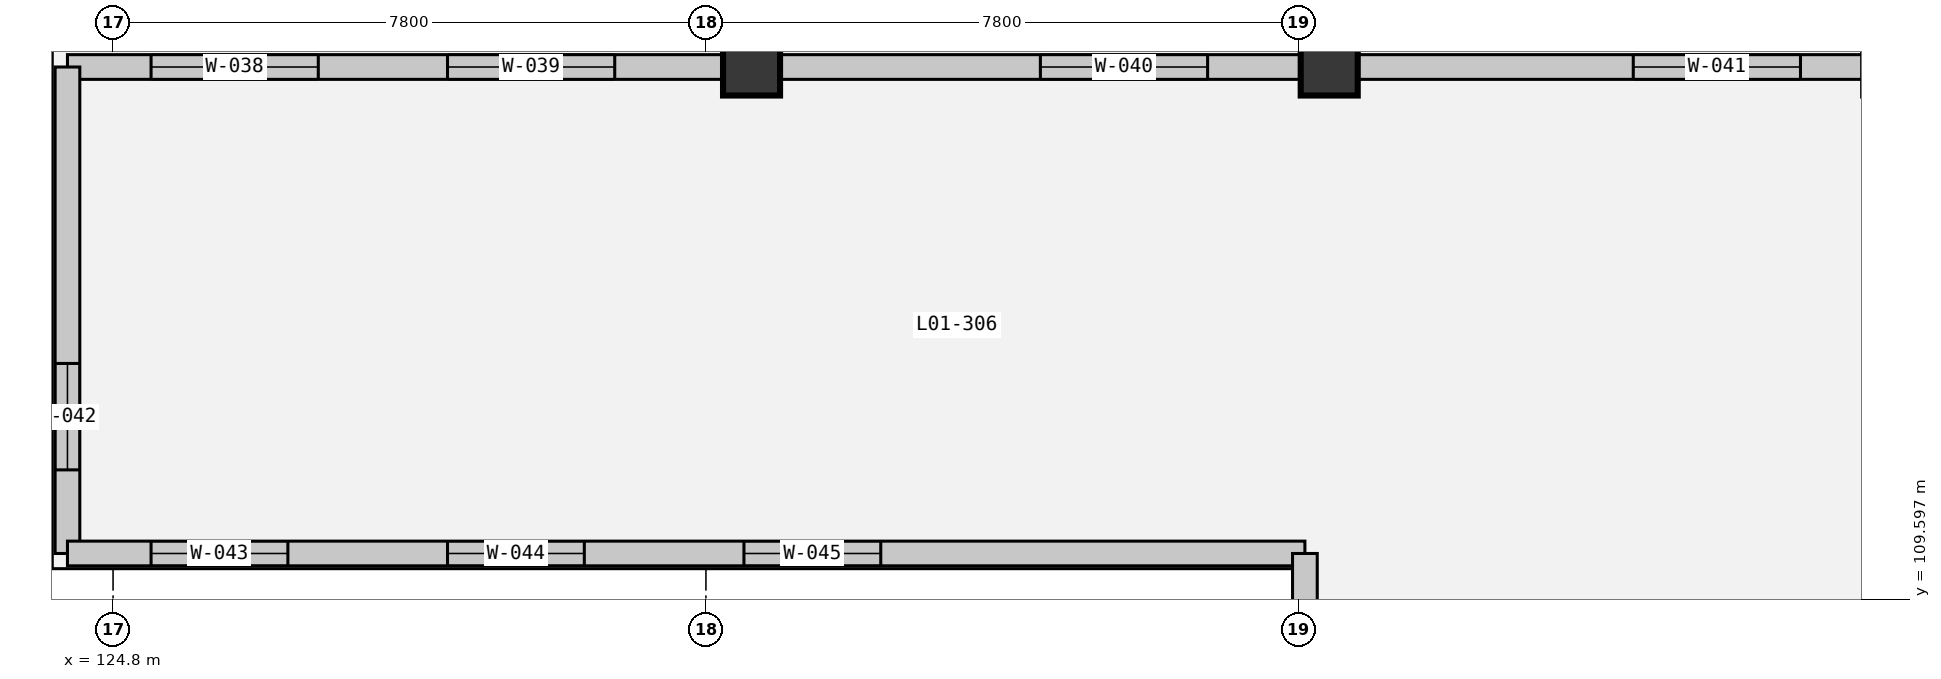
"""IFC4 building model, lengths in metres.
Left out: names, types, materials, properties, quantities, classifications, styles, units other than length and angle.
Written with IfcOpenShell. Run it as: python <this file> out.ifc"""

import sys

from ifc_helpers import new_model, si_unit, direction, frame, frame_2d, origin, origin_2d, place, context, subcontext, project, spatial, rectangle, extrude, element, fill, save


model = new_model("IFC4")
c1 = context("Model", 3, precision=1e-05, world=origin(), true_north=direction((0.0, 1.0)))
c2 = subcontext(c1, "Body", "Model", "MODEL_VIEW")
j1 = project(units=[si_unit("LENGTHUNIT", "METRE"), si_unit("PLANEANGLEUNIT", "RADIAN")], contexts=[c1])
p1 = place(None, origin())
s1 = spatial("IfcSite", under=j1, at=p1, CompositionType="ELEMENT")
p2 = place(p1, origin())
s2 = spatial("IfcBuilding", under=s1, at=p2, CompositionType="ELEMENT")
p3 = place(p2, frame((0.0, 0.0, 5.4)))
s3 = spatial("IfcBuildingStorey", under=s2, at=p3, CompositionType="ELEMENT", Elevation=5.4)
for number, where, z_axis, x_axis in (
    (1, (133.2, 116.6, 0.0), (0.0, 0.0, 1.0), (1.0, 0.0, 0.0)),
    (2, (140.8, 116.6, 0.0), (0.0, 0.0, 1.0), (1.0, 0.0, 0.0)),
):
    element("IfcColumn", number, at=place(p3, frame(where, z_axis=z_axis, x_axis=x_axis)), inside=s3, PredefinedType="COLUMN", context=c2, shape_type="SweptSolid", body=[
        extrude(rectangle(XDim=0.75, YDim=0.75, at=origin_2d()), origin(), (0.0, 0.0, 1.0), 4.8),
    ])
p4 = place(p3, frame((124.2, 116.6, 0.0), z_axis=(0.0, 0.0, 1.0), x_axis=(1.0, 0.0, 0.0)))
e3 = element("IfcWall", 3, at=p4, inside=s3, PredefinedType="SOLIDWALL", context=c2, shape_type="SweptSolid", body=[
    extrude(rectangle(XDim=32.7, YDim=0.325, at=frame_2d((16.35, 0.0))), origin(), (0.0, 0.0, 1.0), 3.86),
])
p5 = place(p4, frame((1.1, 0.0, 0.78)))
e4 = element("IfcOpeningElement", 4, at=p5, cuts=e3, PredefinedType="OPENING", context=c2, shape_type="SweptSolid", body=[
    extrude(rectangle(XDim=2.2, YDim=2.75, at=frame_2d((1.1, 1.375))), frame((0.0, 0.172, 0.0), z_axis=(0.0, -1.0, 0.0), x_axis=(1.0, 0.0, 0.0)), (0.0, 0.0, 1.0), 0.345),
])
p6 = place(p4, frame((5.0, 0.0, 0.78)))
e5 = element("IfcOpeningElement", 5, at=p6, cuts=e3, PredefinedType="OPENING", context=c2, shape_type="SweptSolid", body=[
    extrude(rectangle(XDim=2.2, YDim=2.75, at=frame_2d((1.1, 1.375))), frame((0.0, 0.172, 0.0), z_axis=(0.0, -1.0, 0.0), x_axis=(1.0, 0.0, 0.0)), (0.0, 0.0, 1.0), 0.345),
])
p7 = place(p4, frame((12.8, 0.0, 0.78)))
e6 = element("IfcOpeningElement", 6, at=p7, cuts=e3, PredefinedType="OPENING", context=c2, shape_type="SweptSolid", body=[
    extrude(rectangle(XDim=2.2, YDim=2.75, at=frame_2d((1.1, 1.375))), frame((0.0, 0.172, 0.0), z_axis=(0.0, -1.0, 0.0), x_axis=(1.0, 0.0, 0.0)), (0.0, 0.0, 1.0), 0.345),
])
p8 = place(p4, frame((20.6, 0.0, 0.78)))
e7 = element("IfcOpeningElement", 7, at=p8, cuts=e3, PredefinedType="OPENING", context=c2, shape_type="SweptSolid", body=[
    extrude(rectangle(XDim=2.2, YDim=2.75, at=frame_2d((1.1, 1.375))), frame((0.0, 0.172, 0.0), z_axis=(0.0, -1.0, 0.0), x_axis=(1.0, 0.0, 0.0)), (0.0, 0.0, 1.0), 0.345),
])
p9 = place(p3, frame((124.2, 110.2, 0.0), z_axis=(0.0, 0.0, 1.0), x_axis=(0.0, 1.0, 0.0)))
e8 = element("IfcWall", 8, at=p9, inside=s3, PredefinedType="SOLIDWALL", context=c2, shape_type="SweptSolid", body=[
    extrude(rectangle(XDim=6.4, YDim=0.325, at=frame_2d((3.2, 0.0))), origin(), (0.0, 0.0, 1.0), 3.86),
])
p10 = place(p9, frame((1.1, 0.0, 0.78)))
e9 = element("IfcOpeningElement", 9, at=p10, cuts=e8, PredefinedType="OPENING", context=c2, shape_type="SweptSolid", body=[
    extrude(rectangle(XDim=1.4, YDim=1.4, at=frame_2d((0.7, 0.7))), frame((0.0, 0.172, 0.0), z_axis=(0.0, -1.0, 0.0), x_axis=(1.0, 0.0, 0.0)), (0.0, 0.0, 1.0), 0.345),
])
p11 = place(p3, frame((124.2, 110.2, 0.0), z_axis=(0.0, 0.0, 1.0), x_axis=(1.0, 0.0, 0.0)))
e10 = element("IfcWall", 10, at=p11, inside=s3, PredefinedType="SOLIDWALL", context=c2, shape_type="SweptSolid", body=[
    extrude(rectangle(XDim=16.28, YDim=0.325, at=frame_2d((8.14, 0.0))), origin(), (0.0, 0.0, 1.0), 3.86),
])
p12 = place(p11, frame((1.1, 0.0, 0.78)))
e11 = element("IfcOpeningElement", 11, at=p12, cuts=e10, PredefinedType="OPENING", context=c2, shape_type="SweptSolid", body=[
    extrude(rectangle(XDim=1.8, YDim=2.1, at=frame_2d((0.9, 1.05))), frame((0.0, 0.172, 0.0), z_axis=(0.0, -1.0, 0.0), x_axis=(1.0, 0.0, 0.0)), (0.0, 0.0, 1.0), 0.345),
])
p13 = place(p11, frame((5.0, 0.0, 0.78)))
e12 = element("IfcOpeningElement", 12, at=p13, cuts=e10, PredefinedType="OPENING", context=c2, shape_type="SweptSolid", body=[
    extrude(rectangle(XDim=1.8, YDim=2.1, at=frame_2d((0.9, 1.05))), frame((0.0, 0.172, 0.0), z_axis=(0.0, -1.0, 0.0), x_axis=(1.0, 0.0, 0.0)), (0.0, 0.0, 1.0), 0.345),
])
p14 = place(p11, frame((8.9, 0.0, 0.78)))
e13 = element("IfcOpeningElement", 13, at=p14, cuts=e10, PredefinedType="OPENING", context=c2, shape_type="SweptSolid", body=[
    extrude(rectangle(XDim=1.8, YDim=2.1, at=frame_2d((0.9, 1.05))), frame((0.0, 0.172, 0.0), z_axis=(0.0, -1.0, 0.0), x_axis=(1.0, 0.0, 0.0)), (0.0, 0.0, 1.0), 0.345),
])
p15 = place(p3, frame((140.48, 32.0, 0.0), z_axis=(0.0, 0.0, 1.0), x_axis=(0.0, 1.0, 0.0)))
e14 = element("IfcWall", 14, at=p15, inside=s3, PredefinedType="SOLIDWALL", context=c2, shape_type="SweptSolid", body=[
    extrude(rectangle(XDim=78.2, YDim=0.325, at=frame_2d((39.1, 0.0))), origin(), (0.0, 0.0, 1.0), 3.86),
])
p16 = place(p15, frame((5.0, 0.0, 0.78)))
e15 = element("IfcOpeningElement", 15, at=p16, cuts=e14, PredefinedType="OPENING", context=c2, shape_type="SweptSolid", body=[
    extrude(rectangle(XDim=2.1, YDim=2.6, at=frame_2d((1.05, 1.3))), frame((0.0, 0.172, 0.0), z_axis=(0.0, -1.0, 0.0), x_axis=(1.0, 0.0, 0.0)), (0.0, 0.0, 1.0), 0.345),
])
p17 = place(p15, frame((16.7, 0.0, 0.78)))
e16 = element("IfcOpeningElement", 16, at=p17, cuts=e14, PredefinedType="OPENING", context=c2, shape_type="SweptSolid", body=[
    extrude(rectangle(XDim=2.1, YDim=2.6, at=frame_2d((1.05, 1.3))), frame((0.0, 0.172, 0.0), z_axis=(0.0, -1.0, 0.0), x_axis=(1.0, 0.0, 0.0)), (0.0, 0.0, 1.0), 0.345),
])
p18 = place(p15, frame((24.5, 0.0, 0.78)))
e17 = element("IfcOpeningElement", 17, at=p18, cuts=e14, PredefinedType="OPENING", context=c2, shape_type="SweptSolid", body=[
    extrude(rectangle(XDim=2.1, YDim=2.6, at=frame_2d((1.05, 1.3))), frame((0.0, 0.172, 0.0), z_axis=(0.0, -1.0, 0.0), x_axis=(1.0, 0.0, 0.0)), (0.0, 0.0, 1.0), 0.345),
])
p19 = place(p15, frame((32.3, 0.0, 0.78)))
e18 = element("IfcOpeningElement", 18, at=p19, cuts=e14, PredefinedType="OPENING", context=c2, shape_type="SweptSolid", body=[
    extrude(rectangle(XDim=2.1, YDim=2.6, at=frame_2d((1.05, 1.3))), frame((0.0, 0.172, 0.0), z_axis=(0.0, -1.0, 0.0), x_axis=(1.0, 0.0, 0.0)), (0.0, 0.0, 1.0), 0.345),
])
p20 = place(p15, frame((40.1, 0.0, 0.78)))
e19 = element("IfcOpeningElement", 19, at=p20, cuts=e14, PredefinedType="OPENING", context=c2, shape_type="SweptSolid", body=[
    extrude(rectangle(XDim=2.1, YDim=2.6, at=frame_2d((1.05, 1.3))), frame((0.0, 0.172, 0.0), z_axis=(0.0, -1.0, 0.0), x_axis=(1.0, 0.0, 0.0)), (0.0, 0.0, 1.0), 0.345),
])
p21 = place(p15, frame((55.7, 0.0, 0.78)))
e20 = element("IfcOpeningElement", 20, at=p21, cuts=e14, PredefinedType="OPENING", context=c2, shape_type="SweptSolid", body=[
    extrude(rectangle(XDim=2.1, YDim=2.6, at=frame_2d((1.05, 1.3))), frame((0.0, 0.172, 0.0), z_axis=(0.0, -1.0, 0.0), x_axis=(1.0, 0.0, 0.0)), (0.0, 0.0, 1.0), 0.345),
])
p22 = place(p15, frame((59.6, 0.0, 0.78)))
e21 = element("IfcOpeningElement", 21, at=p22, cuts=e14, PredefinedType="OPENING", context=c2, shape_type="SweptSolid", body=[
    extrude(rectangle(XDim=2.1, YDim=2.6, at=frame_2d((1.05, 1.3))), frame((0.0, 0.172, 0.0), z_axis=(0.0, -1.0, 0.0), x_axis=(1.0, 0.0, 0.0)), (0.0, 0.0, 1.0), 0.345),
])
p23 = place(p15, frame((63.5, 0.0, 0.78)))
e22 = element("IfcOpeningElement", 22, at=p23, cuts=e14, PredefinedType="OPENING", context=c2, shape_type="SweptSolid", body=[
    extrude(rectangle(XDim=2.1, YDim=2.6, at=frame_2d((1.05, 1.3))), frame((0.0, 0.172, 0.0), z_axis=(0.0, -1.0, 0.0), x_axis=(1.0, 0.0, 0.0)), (0.0, 0.0, 1.0), 0.345),
])
p24 = place(p15, frame((67.4, 0.0, 0.78)))
e23 = element("IfcOpeningElement", 23, at=p24, cuts=e14, PredefinedType="OPENING", context=c2, shape_type="SweptSolid", body=[
    extrude(rectangle(XDim=2.1, YDim=2.6, at=frame_2d((1.05, 1.3))), frame((0.0, 0.172, 0.0), z_axis=(0.0, -1.0, 0.0), x_axis=(1.0, 0.0, 0.0)), (0.0, 0.0, 1.0), 0.345),
])
p25 = place(p15, frame((71.3, 0.0, 0.78)))
e24 = element("IfcOpeningElement", 24, at=p25, cuts=e14, PredefinedType="OPENING", context=c2, shape_type="SweptSolid", body=[
    extrude(rectangle(XDim=2.1, YDim=2.6, at=frame_2d((1.05, 1.3))), frame((0.0, 0.172, 0.0), z_axis=(0.0, -1.0, 0.0), x_axis=(1.0, 0.0, 0.0)), (0.0, 0.0, 1.0), 0.345),
])
p26 = place(p5, origin())
e25 = element("IfcWindow", 25, at=p26, inside=s3, PartitioningType="SINGLE_PANEL", PredefinedType="WINDOW", context=c2, shape_type="SweptSolid", body=[
    extrude(rectangle(XDim=2.2, YDim=2.75, at=frame_2d((1.1, 1.375))), frame((0.0, 0.03, 0.0), z_axis=(0.0, -1.0, 0.0), x_axis=(1.0, 0.0, 0.0)), (0.0, 0.0, 1.0), 0.06),
])
fill(e4, e25)
p27 = place(p6, origin())
e26 = element("IfcWindow", 26, at=p27, inside=s3, PartitioningType="SINGLE_PANEL", PredefinedType="WINDOW", context=c2, shape_type="SweptSolid", body=[
    extrude(rectangle(XDim=2.2, YDim=2.75, at=frame_2d((1.1, 1.375))), frame((0.0, 0.03, 0.0), z_axis=(0.0, -1.0, 0.0), x_axis=(1.0, 0.0, 0.0)), (0.0, 0.0, 1.0), 0.06),
])
fill(e5, e26)
p28 = place(p7, origin())
e27 = element("IfcWindow", 27, at=p28, inside=s3, PartitioningType="SINGLE_PANEL", PredefinedType="WINDOW", context=c2, shape_type="SweptSolid", body=[
    extrude(rectangle(XDim=2.2, YDim=2.75, at=frame_2d((1.1, 1.375))), frame((0.0, 0.03, 0.0), z_axis=(0.0, -1.0, 0.0), x_axis=(1.0, 0.0, 0.0)), (0.0, 0.0, 1.0), 0.06),
])
fill(e6, e27)
p29 = place(p8, origin())
e28 = element("IfcWindow", 28, at=p29, inside=s3, PartitioningType="SINGLE_PANEL", PredefinedType="WINDOW", context=c2, shape_type="SweptSolid", body=[
    extrude(rectangle(XDim=2.2, YDim=2.75, at=frame_2d((1.1, 1.375))), frame((0.0, 0.03, 0.0), z_axis=(0.0, -1.0, 0.0), x_axis=(1.0, 0.0, 0.0)), (0.0, 0.0, 1.0), 0.06),
])
fill(e7, e28)
p30 = place(p10, origin())
e29 = element("IfcWindow", 29, at=p30, inside=s3, PartitioningType="SINGLE_PANEL", PredefinedType="WINDOW", context=c2, shape_type="SweptSolid", body=[
    extrude(rectangle(XDim=1.4, YDim=1.4, at=frame_2d((0.7, 0.7))), frame((0.0, 0.03, 0.0), z_axis=(0.0, -1.0, 0.0), x_axis=(1.0, 0.0, 0.0)), (0.0, 0.0, 1.0), 0.06),
])
fill(e9, e29)
p31 = place(p12, origin())
e30 = element("IfcWindow", 30, at=p31, inside=s3, PartitioningType="SINGLE_PANEL", PredefinedType="WINDOW", context=c2, shape_type="SweptSolid", body=[
    extrude(rectangle(XDim=1.8, YDim=2.1, at=frame_2d((0.9, 1.05))), frame((0.0, 0.03, 0.0), z_axis=(0.0, -1.0, 0.0), x_axis=(1.0, 0.0, 0.0)), (0.0, 0.0, 1.0), 0.06),
])
fill(e11, e30)
p32 = place(p13, origin())
e31 = element("IfcWindow", 31, at=p32, inside=s3, PartitioningType="SINGLE_PANEL", PredefinedType="WINDOW", context=c2, shape_type="SweptSolid", body=[
    extrude(rectangle(XDim=1.8, YDim=2.1, at=frame_2d((0.9, 1.05))), frame((0.0, 0.03, 0.0), z_axis=(0.0, -1.0, 0.0), x_axis=(1.0, 0.0, 0.0)), (0.0, 0.0, 1.0), 0.06),
])
fill(e12, e31)
p33 = place(p14, origin())
e32 = element("IfcWindow", 32, at=p33, inside=s3, PartitioningType="SINGLE_PANEL", PredefinedType="WINDOW", context=c2, shape_type="SweptSolid", body=[
    extrude(rectangle(XDim=1.8, YDim=2.1, at=frame_2d((0.9, 1.05))), frame((0.0, 0.03, 0.0), z_axis=(0.0, -1.0, 0.0), x_axis=(1.0, 0.0, 0.0)), (0.0, 0.0, 1.0), 0.06),
])
fill(e13, e32)
save(model, sys.argv[1])
